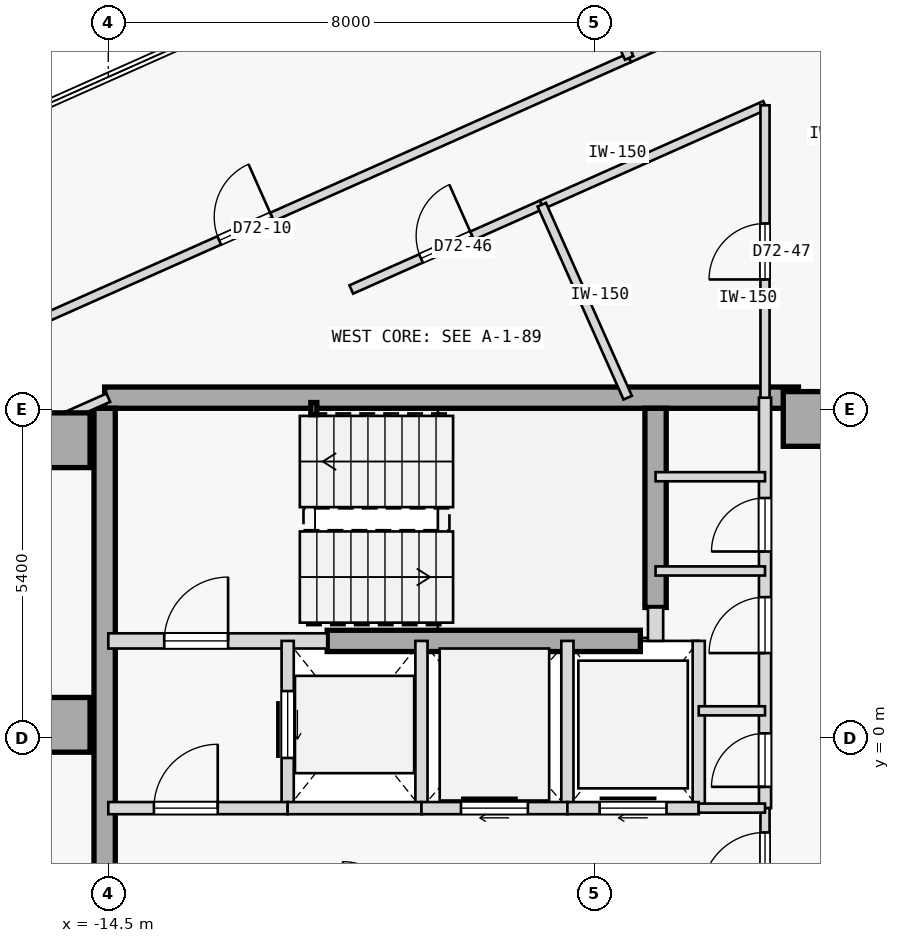
"""IFC4 building model, lengths in metres.
Left out: names, types, materials, properties, quantities, classifications, styles, units other than length and angle.
Written with IfcOpenShell. Run it as: python <this file> out.ifc"""

import sys

from ifc_helpers import new_model, si_unit, direction, frame, frame_2d, origin, origin_2d, place, context, subcontext, project, spatial, rectangle, hollow_rectangle, extrude, element, fill, save


model = new_model("IFC4")
c1 = context("Model", 3, precision=1e-05, world=origin(), true_north=direction((0.0, 1.0)))
c2 = subcontext(c1, "Body", "Model", "MODEL_VIEW")
j1 = project(units=[si_unit("LENGTHUNIT", "METRE"), si_unit("PLANEANGLEUNIT", "RADIAN")], contexts=[c1])
p1 = place(None, origin())
s1 = spatial("IfcSite", under=j1, at=p1, CompositionType="ELEMENT")
p2 = place(p1, origin())
s2 = spatial("IfcBuilding", under=s1, at=p2, CompositionType="ELEMENT")
p3 = place(p2, frame((0.0, 0.0, 268.9)))
s3 = spatial("IfcBuildingStorey", under=s2, at=p3, CompositionType="ELEMENT", Elevation=268.9)
for number, where, z_axis, x_axis in (
    (1, (-15.25, 4.9, 0.0), (0.0, 0.0, 1.0), (1.0, 0.0, 0.0)),
    (2, (-15.25, 0.22, 0.0), (0.0, 0.0, 1.0), (1.0, 0.0, 0.0)),
    (3, (-2.95, 5.25, 0.0), (0.0, 0.0, 1.0), (1.0, 0.0, 0.0)),
):
    element("IfcColumn", number, at=place(p3, frame(where, z_axis=z_axis, x_axis=x_axis)), inside=s3, PredefinedType="COLUMN", context=c2, shape_type="SweptSolid", body=[
        extrude(rectangle(XDim=0.9, YDim=0.9, at=origin_2d()), origin(), (0.0, 0.0, 1.0), 3.35),
    ])
p4 = place(p3, frame((-14.56, 5.6, 0.0), z_axis=(0.0, 0.0, 1.0), x_axis=(1.0, 0.0, 0.0)))
e4 = element("IfcWall", 4, at=p4, inside=s3, PredefinedType="SHEAR", context=c2, shape_type="SweptSolid", body=[
    extrude(rectangle(XDim=11.41, YDim=0.35, at=frame_2d((5.705, 0.0))), origin(), (0.0, 0.0, 1.0), 3.125),
])
p5 = place(p3, frame((-14.56, -5.425, 0.0), z_axis=(0.0, 0.0, 1.0), x_axis=(0.0, 1.0, 0.0)))
e5 = element("IfcWall", 5, at=p5, inside=s3, PredefinedType="SHEAR", context=c2, shape_type="SweptSolid", body=[
    extrude(rectangle(XDim=10.85, YDim=0.35, at=frame_2d((5.425, 0.0))), origin(), (0.0, 0.0, 1.0), 3.125),
])
p6 = place(p3, frame((-5.5, 2.15, 0.0), z_axis=(0.0, 0.0, 1.0), x_axis=(0.0, 1.0, 0.0)))
e6 = element("IfcWall", 6, at=p6, inside=s3, PredefinedType="SHEAR", context=c2, shape_type="SweptSolid", body=[
    extrude(rectangle(XDim=3.275, YDim=0.35, at=frame_2d((1.638, 0.0))), origin(), (0.0, 0.0, 1.0), 3.125),
])
p7 = place(p3, frame((-10.9, 1.6, 0.0), z_axis=(0.0, 0.0, 1.0), x_axis=(1.0, 0.0, 0.0)))
e7 = element("IfcWall", 7, at=p7, inside=s3, PredefinedType="SHEAR", context=c2, shape_type="SweptSolid", body=[
    extrude(rectangle(XDim=5.15, YDim=0.35, at=frame_2d((2.575, 0.0))), origin(), (0.0, 0.0, 1.0), 3.125),
])
p8 = place(p3, frame((-11.12, 5.42, 0.0), z_axis=(0.0, 0.0, 1.0), x_axis=(1.0, 0.0, 0.0)))
e8 = element("IfcColumn", 8, at=p8, inside=s3, PredefinedType="COLUMN", context=c2, shape_type="SweptSolid", body=[
    extrude(hollow_rectangle(XDim=0.1, YDim=0.2, WallThickness=0.008, at=origin_2d()), origin(), (0.0, 0.0, 1.0), 3.35),
])
p9 = place(p3, frame((-14.5, 1.6, 0.0), z_axis=(0.0, 0.0, 1.0), x_axis=(1.0, 0.0, 0.0)))
e9 = element("IfcWall", 9, at=p9, inside=s3, PredefinedType="STANDARD", context=c2, shape_type="SweptSolid", body=[
    extrude(rectangle(XDim=3.6, YDim=0.25, at=frame_2d((1.8, 0.0))), origin(), (0.0, 0.0, 1.0), 3.125),
])
p10 = place(p9, frame((0.92, 0.0, 0.0)))
e10 = element("IfcOpeningElement", 10, at=p10, cuts=e9, PredefinedType="OPENING", context=c2, shape_type="SweptSolid", body=[
    extrude(rectangle(XDim=1.05, YDim=2.15, at=frame_2d((0.525, 1.075))), frame((0.0, 0.135, 0.0), z_axis=(0.0, -1.0, 0.0), x_axis=(1.0, 0.0, 0.0)), (0.0, 0.0, 1.0), 0.27),
])
p11 = place(p3, frame((-5.5, 1.6, 0.0), z_axis=(0.0, 0.0, 1.0), x_axis=(0.0, 1.0, 0.0)))
e11 = element("IfcWall", 11, at=p11, inside=s3, PredefinedType="STANDARD", context=c2, shape_type="SweptSolid", body=[
    extrude(rectangle(XDim=0.55, YDim=0.25, at=frame_2d((0.275, 0.0))), origin(), (0.0, 0.0, 1.0), 3.125),
])
p12 = place(p3, frame((-3.7, -1.15, 0.0), z_axis=(0.0, 0.0, 1.0), x_axis=(0.0, 1.0, 0.0)))
e12 = element("IfcWall", 12, at=p12, inside=s3, PredefinedType="STANDARD", context=c2, shape_type="SweptSolid", body=[
    extrude(rectangle(XDim=6.75, YDim=0.2, at=frame_2d((3.375, 0.0))), origin(), (0.0, 0.0, 1.0), 3.125),
])
p13 = place(p12, frame((0.35, 0.0, 0.0)))
e13 = element("IfcOpeningElement", 13, at=p13, cuts=e12, PredefinedType="OPENING", context=c2, shape_type="SweptSolid", body=[
    extrude(rectangle(XDim=0.88, YDim=2.15, at=frame_2d((0.44, 1.075))), frame((0.0, 0.11, 0.0), z_axis=(0.0, -1.0, 0.0), x_axis=(1.0, 0.0, 0.0)), (0.0, 0.0, 1.0), 0.22),
])
p14 = place(p12, frame((2.55, 0.0, 0.0)))
e14 = element("IfcOpeningElement", 14, at=p14, cuts=e12, PredefinedType="OPENING", context=c2, shape_type="SweptSolid", body=[
    extrude(rectangle(XDim=0.92, YDim=2.15, at=frame_2d((0.46, 1.075))), frame((0.0, 0.11, 0.0), z_axis=(0.0, -1.0, 0.0), x_axis=(1.0, 0.0, 0.0)), (0.0, 0.0, 1.0), 0.22),
])
p15 = place(p12, frame((4.22, 0.0, 0.0)))
e15 = element("IfcOpeningElement", 15, at=p15, cuts=e12, PredefinedType="OPENING", context=c2, shape_type="SweptSolid", body=[
    extrude(rectangle(XDim=0.88, YDim=2.15, at=frame_2d((0.44, 1.075))), frame((0.0, 0.11, 0.0), z_axis=(0.0, -1.0, 0.0), x_axis=(1.0, 0.0, 0.0)), (0.0, 0.0, 1.0), 0.22),
])
p16 = place(p3, frame((-3.7, -2.95, 0.0), z_axis=(0.0, 0.0, 1.0), x_axis=(0.0, 1.0, 0.0)))
e16 = element("IfcWall", 16, at=p16, inside=s3, PredefinedType="PARTITIONING", context=c2, shape_type="SweptSolid", body=[
    extrude(rectangle(XDim=1.8, YDim=0.15, at=frame_2d((0.9, 0.0))), origin(), (0.0, 0.0, 1.0), 3.125),
])
p17 = place(p16, frame((0.35, 0.0, 0.0)))
e17 = element("IfcOpeningElement", 17, at=p17, cuts=e16, PredefinedType="OPENING", context=c2, shape_type="SweptSolid", body=[
    extrude(rectangle(XDim=1.05, YDim=2.18, at=frame_2d((0.525, 1.09))), frame((0.0, 0.085, 0.0), z_axis=(0.0, -1.0, 0.0), x_axis=(1.0, 0.0, 0.0)), (0.0, 0.0, 1.0), 0.17),
])
p18 = place(p3, frame((-11.55, -1.15, 0.0), z_axis=(0.0, 0.0, 1.0), x_axis=(0.0, 1.0, 0.0)))
e18 = element("IfcWall", 18, at=p18, inside=s3, PredefinedType="STANDARD", context=c2, shape_type="SweptSolid", body=[
    extrude(rectangle(XDim=2.75, YDim=0.2, at=frame_2d((1.375, 0.0))), origin(), (0.0, 0.0, 1.0), 3.125),
])
p19 = place(p18, frame((0.825, 0.0, 0.0)))
e19 = element("IfcOpeningElement", 19, at=p19, cuts=e18, PredefinedType="OPENING", context=c2, shape_type="SweptSolid", body=[
    extrude(rectangle(XDim=1.1, YDim=2.15, at=frame_2d((0.55, 1.075))), frame((0.0, 0.11, 0.0), z_axis=(0.0, -1.0, 0.0), x_axis=(1.0, 0.0, 0.0)), (0.0, 0.0, 1.0), 0.22),
])
p20 = place(p3, frame((-9.35, -1.15, 0.0), z_axis=(0.0, 0.0, 1.0), x_axis=(0.0, 1.0, 0.0)))
e20 = element("IfcWall", 20, at=p20, inside=s3, PredefinedType="STANDARD", context=c2, shape_type="SweptSolid", body=[
    extrude(rectangle(XDim=2.75, YDim=0.2, at=frame_2d((1.375, 0.0))), origin(), (0.0, 0.0, 1.0), 3.125),
])
p21 = place(p3, frame((-14.5, -1.15, 0.0), z_axis=(0.0, 0.0, 1.0), x_axis=(1.0, 0.0, 0.0)))
e21 = element("IfcWall", 21, at=p21, inside=s3, PredefinedType="STANDARD", context=c2, shape_type="SweptSolid", body=[
    extrude(rectangle(XDim=2.95, YDim=0.2, at=frame_2d((1.475, 0.0))), origin(), (0.0, 0.0, 1.0), 3.125),
])
p22 = place(p21, frame((0.75, 0.0, 0.0)))
e22 = element("IfcOpeningElement", 22, at=p22, cuts=e21, PredefinedType="OPENING", context=c2, shape_type="SweptSolid", body=[
    extrude(rectangle(XDim=1.05, YDim=2.18, at=frame_2d((0.525, 1.09))), frame((0.0, 0.11, 0.0), z_axis=(0.0, -1.0, 0.0), x_axis=(1.0, 0.0, 0.0)), (0.0, 0.0, 1.0), 0.22),
])
p23 = place(p3, frame((-11.55, -1.15, 0.0), z_axis=(0.0, 0.0, 1.0), x_axis=(1.0, 0.0, 0.0)))
e23 = element("IfcWall", 23, at=p23, inside=s3, PredefinedType="STANDARD", context=c2, shape_type="SweptSolid", body=[
    extrude(rectangle(XDim=2.2, YDim=0.2, at=frame_2d((1.1, 0.0))), origin(), (0.0, 0.0, 1.0), 3.125),
])
p24 = place(p3, frame((-6.95, -1.15, 0.0), z_axis=(0.0, 0.0, 1.0), x_axis=(0.0, 1.0, 0.0)))
e24 = element("IfcWall", 24, at=p24, inside=s3, PredefinedType="STANDARD", context=c2, shape_type="SweptSolid", body=[
    extrude(rectangle(XDim=2.75, YDim=0.2, at=frame_2d((1.375, 0.0))), origin(), (0.0, 0.0, 1.0), 3.125),
])
p25 = place(p3, frame((-9.35, -1.15, 0.0), z_axis=(0.0, 0.0, 1.0), x_axis=(1.0, 0.0, 0.0)))
e25 = element("IfcWall", 25, at=p25, inside=s3, PredefinedType="STANDARD", context=c2, shape_type="SweptSolid", body=[
    extrude(rectangle(XDim=2.4, YDim=0.2, at=frame_2d((1.2, 0.0))), origin(), (0.0, 0.0, 1.0), 3.125),
])
p26 = place(p25, frame((0.65, 0.0, 0.0)))
e26 = element("IfcOpeningElement", 26, at=p26, cuts=e25, PredefinedType="OPENING", context=c2, shape_type="SweptSolid", body=[
    extrude(rectangle(XDim=1.1, YDim=2.15, at=frame_2d((0.55, 1.075))), frame((0.0, 0.11, 0.0), z_axis=(0.0, -1.0, 0.0), x_axis=(1.0, 0.0, 0.0)), (0.0, 0.0, 1.0), 0.22),
])
p27 = place(p3, frame((-4.79, -1.15, 0.0), z_axis=(0.0, 0.0, 1.0), x_axis=(0.0, 1.0, 0.0)))
e27 = element("IfcWall", 27, at=p27, inside=s3, PredefinedType="STANDARD", context=c2, shape_type="SweptSolid", body=[
    extrude(rectangle(XDim=2.75, YDim=0.2, at=frame_2d((1.375, 0.0))), origin(), (0.0, 0.0, 1.0), 3.125),
])
p28 = place(p3, frame((-6.95, -1.15, 0.0), z_axis=(0.0, 0.0, 1.0), x_axis=(1.0, 0.0, 0.0)))
e28 = element("IfcWall", 28, at=p28, inside=s3, PredefinedType="STANDARD", context=c2, shape_type="SweptSolid", body=[
    extrude(rectangle(XDim=2.16, YDim=0.2, at=frame_2d((1.08, 0.0))), origin(), (0.0, 0.0, 1.0), 3.125),
])
p29 = place(p28, frame((0.53, 0.0, 0.0)))
e29 = element("IfcOpeningElement", 29, at=p29, cuts=e28, PredefinedType="OPENING", context=c2, shape_type="SweptSolid", body=[
    extrude(rectangle(XDim=1.1, YDim=2.15, at=frame_2d((0.55, 1.075))), frame((0.0, 0.11, 0.0), z_axis=(0.0, -1.0, 0.0), x_axis=(1.0, 0.0, 0.0)), (0.0, 0.0, 1.0), 0.22),
])
p30 = place(p3, frame((-4.79, -1.15, 0.0), z_axis=(0.0, 0.0, 1.0), x_axis=(1.0, 0.0, 0.0)))
e30 = element("IfcWall", 30, at=p30, inside=s3, PredefinedType="PARTITIONING", context=c2, shape_type="SweptSolid", body=[
    extrude(rectangle(XDim=1.09, YDim=0.15, at=frame_2d((0.545, 0.0))), origin(), (0.0, 0.0, 1.0), 3.125),
])
p31 = place(p3, frame((-5.5, 4.3, 0.0), z_axis=(0.0, 0.0, 1.0), x_axis=(1.0, 0.0, 0.0)))
e31 = element("IfcWall", 31, at=p31, inside=s3, PredefinedType="PARTITIONING", context=c2, shape_type="SweptSolid", body=[
    extrude(rectangle(XDim=1.8, YDim=0.15, at=frame_2d((0.9, 0.0))), origin(), (0.0, 0.0, 1.0), 3.125),
])
p32 = place(p3, frame((-4.79, 0.45, 0.0), z_axis=(0.0, 0.0, 1.0), x_axis=(1.0, 0.0, 0.0)))
e32 = element("IfcWall", 32, at=p32, inside=s3, PredefinedType="PARTITIONING", context=c2, shape_type="SweptSolid", body=[
    extrude(rectangle(XDim=1.09, YDim=0.15, at=frame_2d((0.545, 0.0))), origin(), (0.0, 0.0, 1.0), 3.125),
])
p33 = place(p3, frame((-5.5, 2.75, 0.0), z_axis=(0.0, 0.0, 1.0), x_axis=(1.0, 0.0, 0.0)))
e33 = element("IfcWall", 33, at=p33, inside=s3, PredefinedType="PARTITIONING", context=c2, shape_type="SweptSolid", body=[
    extrude(rectangle(XDim=1.8, YDim=0.15, at=frame_2d((0.9, 0.0))), origin(), (0.0, 0.0, 1.0), 3.125),
])
p34 = place(p3, frame((-18.549, 5.57, 0.0), z_axis=(0.0, 0.0, 1.0), x_axis=(0.913545955058, 0.40673552586, 0.0)))
e34 = element("IfcWall", 34, at=p34, inside=s3, PredefinedType="PARTITIONING", context=c2, shape_type="SweptSolid", body=[
    extrude(rectangle(XDim=13.808, YDim=0.15, at=frame_2d((6.904, 0.0))), origin(), (0.0, 0.0, 1.0), 3.125),
])
p35 = place(p34, frame((6.429, 0.0, 0.0)))
e35 = element("IfcOpeningElement", 35, at=p35, cuts=e34, PredefinedType="OPENING", context=c2, shape_type="SweptSolid", body=[
    extrude(rectangle(XDim=0.95, YDim=2.15, at=frame_2d((0.475, 1.075))), frame((0.0, 0.085, 0.0), z_axis=(0.0, -1.0, 0.0), x_axis=(1.0, 0.0, 0.0)), (0.0, 0.0, 1.0), 0.17),
])
p36 = place(p3, frame((-5.935, 11.187, 0.0), z_axis=(0.0, 0.0, 1.0), x_axis=(0.91354851465, 0.406729776856, 0.0)))
e36 = element("IfcWall", 36, at=p36, inside=s3, PredefinedType="PARTITIONING", context=c2, shape_type="SweptSolid", body=[
    extrude(rectangle(XDim=6.703, YDim=0.15, at=frame_2d((3.352, 0.0))), origin(), (0.0, 0.0, 1.0), 3.125),
])
p37 = place(p3, frame((-18.661, 3.747, 0.0), z_axis=(0.0, 0.0, 1.0), x_axis=(0.913535055583, 0.40676000568, 0.0)))
e37 = element("IfcWall", 37, at=p37, inside=s3, PredefinedType="PARTITIONING", context=c2, shape_type="SweptSolid", body=[
    extrude(rectangle(XDim=4.555, YDim=0.15, at=frame_2d((2.277, 0.0))), origin(), (0.0, 0.0, 1.0), 3.125),
])
p38 = place(p37, frame((1.134, 0.0, 0.0)))
e38 = element("IfcOpeningElement", 38, at=p38, cuts=e37, PredefinedType="OPENING", context=c2, shape_type="SweptSolid", body=[
    extrude(rectangle(XDim=0.92, YDim=2.15, at=frame_2d((0.46, 1.075))), frame((0.0, 0.085, 0.0), z_axis=(0.0, -1.0, 0.0), x_axis=(1.0, 0.0, 0.0)), (0.0, 0.0, 1.0), 0.17),
])
p39 = place(p3, frame((-10.504, 7.379, 0.0), z_axis=(0.0, 0.0, 1.0), x_axis=(0.913526514415, 0.406779187596, 0.0)))
e39 = element("IfcWall", 39, at=p39, inside=s3, PredefinedType="PARTITIONING", context=c2, shape_type="SweptSolid", body=[
    extrude(rectangle(XDim=3.429, YDim=0.15, at=frame_2d((1.714, 0.0))), origin(), (0.0, 0.0, 1.0), 3.125),
])
p40 = place(p39, frame((1.254, 0.0, 0.0)))
e40 = element("IfcOpeningElement", 40, at=p40, cuts=e39, PredefinedType="OPENING", context=c2, shape_type="SweptSolid", body=[
    extrude(rectangle(XDim=0.92, YDim=2.15, at=frame_2d((0.46, 1.075))), frame((0.0, 0.085, 0.0), z_axis=(0.0, -1.0, 0.0), x_axis=(1.0, 0.0, 0.0)), (0.0, 0.0, 1.0), 0.17),
])
p41 = place(p3, frame((-7.372, 8.774, 0.0), z_axis=(0.0, 0.0, 1.0), x_axis=(0.913563383118, 0.406696379412, 0.0)))
e41 = element("IfcWall", 41, at=p41, inside=s3, PredefinedType="PARTITIONING", context=c2, shape_type="SweptSolid", body=[
    extrude(rectangle(XDim=4.019, YDim=0.15, at=frame_2d((2.01, 0.0))), origin(), (0.0, 0.0, 1.0), 3.125),
])
p42 = place(p3, frame((-3.7, 5.6, 0.0), z_axis=(0.0, 0.0, 1.0), x_axis=(5.077173e-05, 0.999999998711, 0.0)))
e42 = element("IfcWall", 42, at=p42, inside=s3, PredefinedType="PARTITIONING", context=c2, shape_type="SweptSolid", body=[
    extrude(rectangle(XDim=4.809, YDim=0.15, at=frame_2d((2.404, 0.0))), origin(), (0.0, 0.0, 1.0), 3.125),
])
p43 = place(p42, frame((1.944, 0.0, 0.0)))
e43 = element("IfcOpeningElement", 43, at=p43, cuts=e42, PredefinedType="OPENING", context=c2, shape_type="SweptSolid", body=[
    extrude(rectangle(XDim=0.92, YDim=2.15, at=frame_2d((0.46, 1.075))), frame((0.0, 0.085, 0.0), z_axis=(0.0, -1.0, 0.0), x_axis=(1.0, 0.0, 0.0)), (0.0, 0.0, 1.0), 0.17),
])
p44 = place(p3, frame((-5.935, 11.187, 0.0), z_axis=(0.0, 0.0, 1.0), x_axis=(-0.406733350739, 0.913546923478, 0.0)))
e44 = element("IfcWall", 44, at=p44, inside=s3, PredefinedType="PARTITIONING", context=c2, shape_type="SweptSolid", body=[
    extrude(rectangle(XDim=3.198, YDim=0.15, at=frame_2d((1.599, 0.0))), origin(), (0.0, 0.0, 1.0), 3.125),
])
p45 = place(p3, frame((-5.958, 5.6, 0.0), z_axis=(0.0, 0.0, 1.0), x_axis=(-0.406738231884, 0.913544750258, 0.0)))
e45 = element("IfcWall", 45, at=p45, inside=s3, PredefinedType="PARTITIONING", context=c2, shape_type="SweptSolid", body=[
    extrude(rectangle(XDim=3.474, YDim=0.15, at=frame_2d((1.737, 0.0))), origin(), (0.0, 0.0, 1.0), 3.125),
])
p46 = place(p10, origin())
e46 = element("IfcDoor", 46, at=p46, inside=s3, OperationType="SINGLE_SWING_RIGHT", PredefinedType="DOOR", context=c2, shape_type="SweptSolid", body=[
    extrude(rectangle(XDim=1.05, YDim=2.15, at=frame_2d((0.525, 1.075))), frame((0.0, 0.025, 0.0), z_axis=(0.0, -1.0, 0.0), x_axis=(1.0, 0.0, 0.0)), (0.0, 0.0, 1.0), 0.05),
])
fill(e10, e46)
p47 = place(p22, origin())
e47 = element("IfcDoor", 47, at=p47, inside=s3, OperationType="SINGLE_SWING_RIGHT", PredefinedType="DOOR", context=c2, shape_type="SweptSolid", body=[
    extrude(rectangle(XDim=1.05, YDim=2.18, at=frame_2d((0.525, 1.09))), frame((0.0, 0.025, 0.0), z_axis=(0.0, -1.0, 0.0), x_axis=(1.0, 0.0, 0.0)), (0.0, 0.0, 1.0), 0.05),
])
fill(e22, e47)
p48 = place(p17, origin())
e48 = element("IfcDoor", 48, at=p48, inside=s3, OperationType="SINGLE_SWING_LEFT", PredefinedType="DOOR", context=c2, shape_type="SweptSolid", body=[
    extrude(rectangle(XDim=1.05, YDim=2.18, at=frame_2d((0.525, 1.09))), frame((0.0, 0.025, 0.0), z_axis=(0.0, -1.0, 0.0), x_axis=(1.0, 0.0, 0.0)), (0.0, 0.0, 1.0), 0.05),
])
fill(e17, e48)
p49 = place(p19, origin())
e49 = element("IfcDoor", 49, at=p49, inside=s3, OperationType="SLIDING_TO_RIGHT", PredefinedType="DOOR", context=c2, shape_type="SweptSolid", body=[
    extrude(rectangle(XDim=1.1, YDim=2.15, at=frame_2d((0.55, 1.075))), frame((0.0, 0.025, 0.0), z_axis=(0.0, -1.0, 0.0), x_axis=(1.0, 0.0, 0.0)), (0.0, 0.0, 1.0), 0.05),
])
fill(e19, e49)
p50 = place(p26, origin())
e50 = element("IfcDoor", 50, at=p50, inside=s3, OperationType="SLIDING_TO_RIGHT", PredefinedType="DOOR", context=c2, shape_type="SweptSolid", body=[
    extrude(rectangle(XDim=1.1, YDim=2.15, at=frame_2d((0.55, 1.075))), frame((0.0, 0.025, 0.0), z_axis=(0.0, -1.0, 0.0), x_axis=(1.0, 0.0, 0.0)), (0.0, 0.0, 1.0), 0.05),
])
fill(e26, e50)
p51 = place(p29, origin())
e51 = element("IfcDoor", 51, at=p51, inside=s3, OperationType="SLIDING_TO_RIGHT", PredefinedType="DOOR", context=c2, shape_type="SweptSolid", body=[
    extrude(rectangle(XDim=1.1, YDim=2.15, at=frame_2d((0.55, 1.075))), frame((0.0, 0.025, 0.0), z_axis=(0.0, -1.0, 0.0), x_axis=(1.0, 0.0, 0.0)), (0.0, 0.0, 1.0), 0.05),
])
fill(e29, e51)
p52 = place(p13, origin())
e52 = element("IfcDoor", 52, at=p52, inside=s3, OperationType="SINGLE_SWING_LEFT", PredefinedType="DOOR", context=c2, shape_type="SweptSolid", body=[
    extrude(rectangle(XDim=0.88, YDim=2.15, at=frame_2d((0.44, 1.075))), frame((0.0, 0.025, 0.0), z_axis=(0.0, -1.0, 0.0), x_axis=(1.0, 0.0, 0.0)), (0.0, 0.0, 1.0), 0.05),
])
fill(e13, e52)
p53 = place(p14, origin())
e53 = element("IfcDoor", 53, at=p53, inside=s3, OperationType="SINGLE_SWING_LEFT", PredefinedType="DOOR", context=c2, shape_type="SweptSolid", body=[
    extrude(rectangle(XDim=0.92, YDim=2.15, at=frame_2d((0.46, 1.075))), frame((0.0, 0.025, 0.0), z_axis=(0.0, -1.0, 0.0), x_axis=(1.0, 0.0, 0.0)), (0.0, 0.0, 1.0), 0.05),
])
fill(e14, e53)
p54 = place(p15, origin())
e54 = element("IfcDoor", 54, at=p54, inside=s3, OperationType="SINGLE_SWING_LEFT", PredefinedType="DOOR", context=c2, shape_type="SweptSolid", body=[
    extrude(rectangle(XDim=0.88, YDim=2.15, at=frame_2d((0.44, 1.075))), frame((0.0, 0.025, 0.0), z_axis=(0.0, -1.0, 0.0), x_axis=(1.0, 0.0, 0.0)), (0.0, 0.0, 1.0), 0.05),
])
fill(e15, e54)
p55 = place(p35, origin())
e55 = element("IfcDoor", 55, at=p55, inside=s3, OperationType="SINGLE_SWING_RIGHT", PredefinedType="DOOR", context=c2, shape_type="SweptSolid", body=[
    extrude(rectangle(XDim=0.95, YDim=2.15, at=frame_2d((0.475, 1.075))), frame((0.0, 0.025, 0.0), z_axis=(0.0, -1.0, 0.0), x_axis=(1.0, 0.0, 0.0)), (0.0, 0.0, 1.0), 0.05),
])
fill(e35, e55)
p56 = place(p40, origin())
e56 = element("IfcDoor", 56, at=p56, inside=s3, OperationType="SINGLE_SWING_RIGHT", PredefinedType="DOOR", context=c2, shape_type="SweptSolid", body=[
    extrude(rectangle(XDim=0.92, YDim=2.15, at=frame_2d((0.46, 1.075))), frame((0.0, 0.025, 0.0), z_axis=(0.0, -1.0, 0.0), x_axis=(1.0, 0.0, 0.0)), (0.0, 0.0, 1.0), 0.05),
])
fill(e40, e56)
p57 = place(p43, origin())
e57 = element("IfcDoor", 57, at=p57, inside=s3, OperationType="SINGLE_SWING_LEFT", PredefinedType="DOOR", context=c2, shape_type="SweptSolid", body=[
    extrude(rectangle(XDim=0.92, YDim=2.15, at=frame_2d((0.46, 1.075))), frame((0.0, 0.025, 0.0), z_axis=(0.0, -1.0, 0.0), x_axis=(1.0, 0.0, 0.0)), (0.0, 0.0, 1.0), 0.05),
])
fill(e43, e57)
save(model, sys.argv[1])
